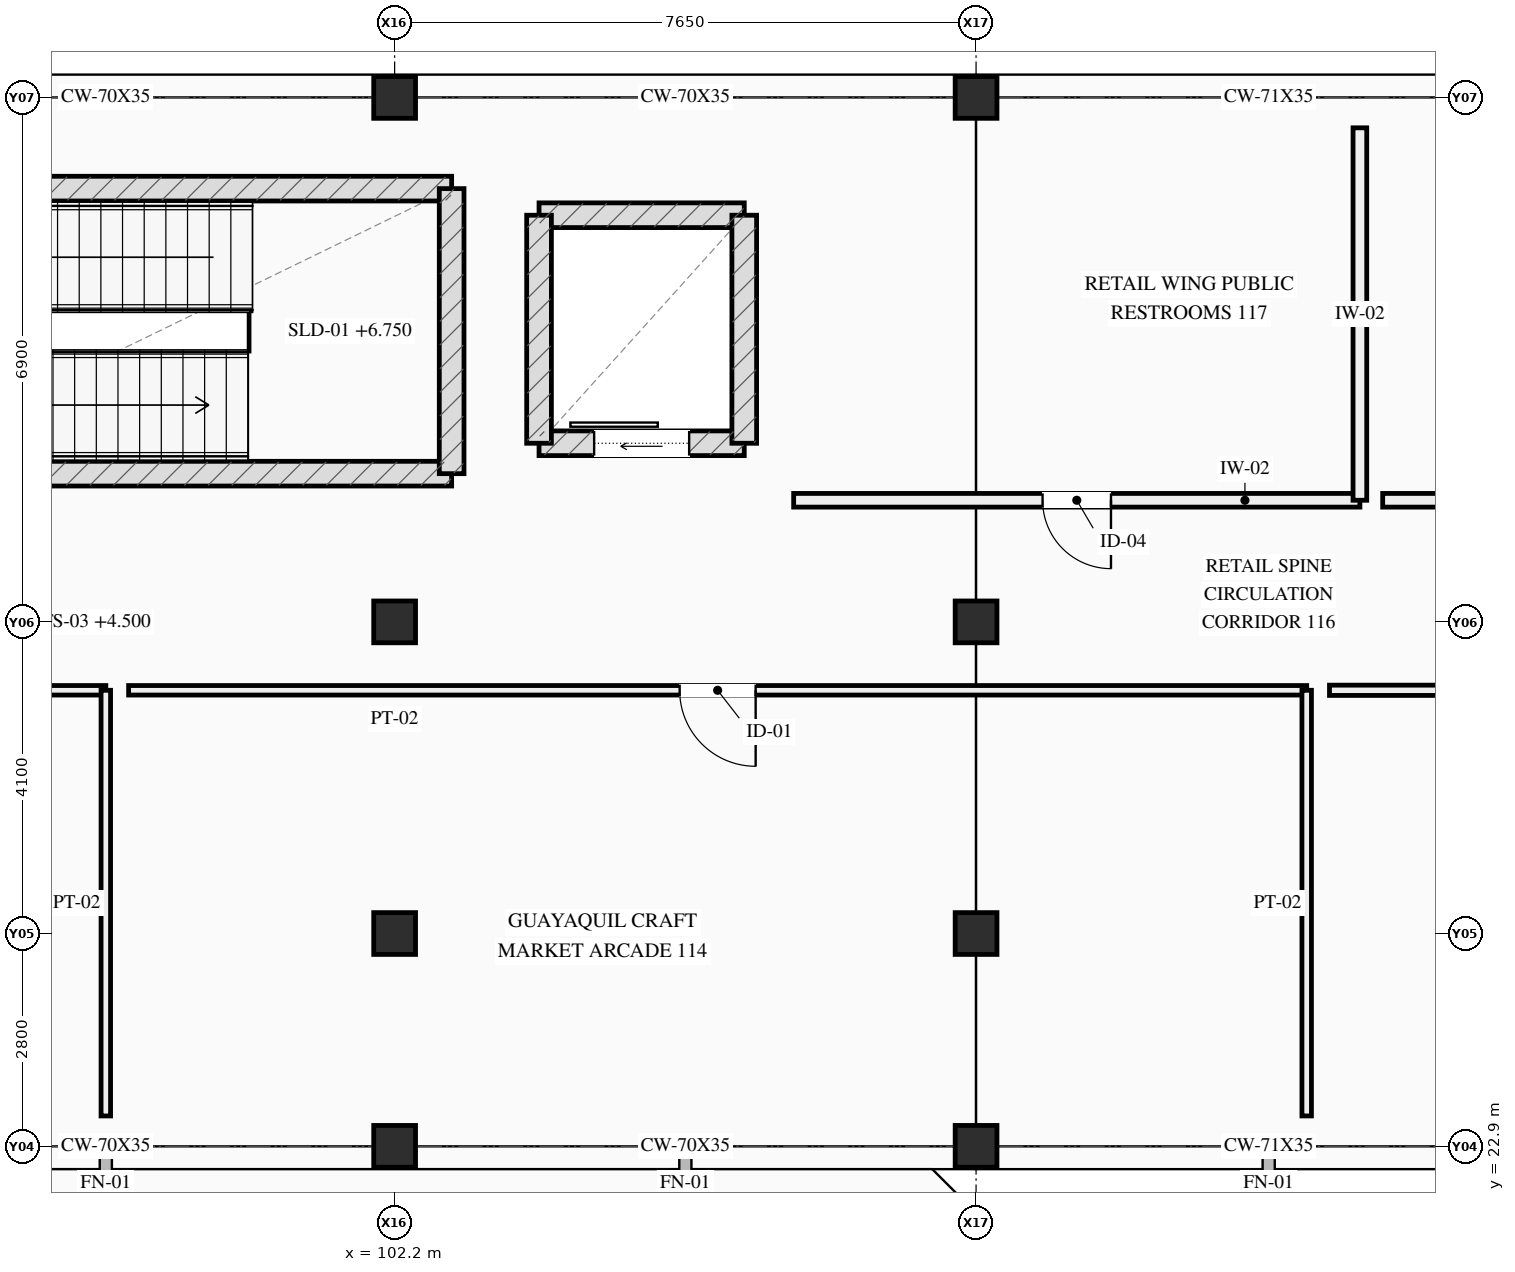
"""IFC4 building model, lengths in metres.
Left out: names, types, materials, properties, quantities, classifications, styles, units other than length and angle.
Written with IfcOpenShell. Run it as: python <this file> out.ifc"""

import sys

from ifc_helpers import new_model, si_unit, direction, frame, frame_2d, origin, origin_2d, place, context, subcontext, project, spatial, rectangle, extrude, element, fill, save


model = new_model("IFC4")
c1 = context("Model", 3, precision=1e-05, world=origin(), true_north=direction((0.0, 1.0)))
c2 = subcontext(c1, "Body", "Model", "MODEL_VIEW")
j1 = project(units=[si_unit("LENGTHUNIT", "METRE"), si_unit("PLANEANGLEUNIT", "RADIAN")], contexts=[c1])
p1 = place(None, origin())
s1 = spatial("IfcSite", under=j1, at=p1, CompositionType="ELEMENT")
p2 = place(p1, origin())
s2 = spatial("IfcBuilding", under=s1, at=p2, CompositionType="ELEMENT")
p3 = place(p2, frame((0.0, 0.0, 4.5)))
s3 = spatial("IfcBuildingStorey", under=s2, at=p3, CompositionType="ELEMENT", Elevation=4.5)
for number, where, z_axis, x_axis in (
    (1, (102.2, 22.9, 0.0), (0.0, 0.0, 1.0), (1.0, 0.0, 0.0)),
    (2, (102.2, 25.7, 0.0), (0.0, 0.0, 1.0), (1.0, 0.0, 0.0)),
    (3, (102.2, 29.8, 0.0), (0.0, 0.0, 1.0), (1.0, 0.0, 0.0)),
    (4, (102.2, 36.7, 0.0), (0.0, 0.0, 1.0), (1.0, 0.0, 0.0)),
    (5, (109.85, 22.9, 0.0), (0.0, 0.0, 1.0), (1.0, 0.0, 0.0)),
    (6, (109.85, 25.7, 0.0), (0.0, 0.0, 1.0), (1.0, 0.0, 0.0)),
    (7, (109.85, 29.8, 0.0), (0.0, 0.0, 1.0), (1.0, 0.0, 0.0)),
    (8, (109.85, 36.7, 0.0), (0.0, 0.0, 1.0), (1.0, 0.0, 0.0)),
):
    element("IfcColumn", number, at=place(p3, frame(where, z_axis=z_axis, x_axis=x_axis)), inside=s3, PredefinedType="COLUMN", context=c2, shape_type="SweptSolid", body=[
        extrude(rectangle(XDim=0.55, YDim=0.55, at=origin_2d()), origin(), (0.0, 0.0, 1.0), 4.5),
    ])
p4 = place(p3, frame((95.25, 31.75, 0.0), z_axis=(0.0, 0.0, 1.0), x_axis=(1.0, 0.0, 0.0)))
e9 = element("IfcWall", 9, at=p4, inside=s3, PredefinedType="SHEAR", context=c2, shape_type="SweptSolid", body=[
    extrude(rectangle(XDim=7.7, YDim=0.325, at=frame_2d((3.85, 0.0))), origin(), (0.0, 0.0, 1.0), 4.25),
])
p5 = place(p4, frame((0.28, 0.0, 0.0)))
e10 = element("IfcOpeningElement", 10, at=p5, cuts=e9, PredefinedType="OPENING", context=c2, shape_type="SweptSolid", body=[
    extrude(rectangle(XDim=1.2, YDim=2.2, at=frame_2d((0.6, 1.1))), frame((0.0, 0.172, 0.0), z_axis=(0.0, -1.0, 0.0), x_axis=(1.0, 0.0, 0.0)), (0.0, 0.0, 1.0), 0.345),
])
p6 = place(p3, frame((102.95, 35.5, 0.0), z_axis=(0.0, 0.0, 1.0), x_axis=(-1.0, 0.0, 0.0)))
e11 = element("IfcWall", 11, at=p6, inside=s3, PredefinedType="SHEAR", context=c2, shape_type="SweptSolid", body=[
    extrude(rectangle(XDim=7.7, YDim=0.325, at=frame_2d((3.85, 0.0))), origin(), (0.0, 0.0, 1.0), 4.25),
])
p7 = place(p3, frame((102.95, 31.75, 0.0), z_axis=(0.0, 0.0, 1.0), x_axis=(0.0, 1.0, 0.0)))
e12 = element("IfcWall", 12, at=p7, inside=s3, PredefinedType="SHEAR", context=c2, shape_type="SweptSolid", body=[
    extrude(rectangle(XDim=3.75, YDim=0.325, at=frame_2d((1.875, 0.0))), origin(), (0.0, 0.0, 1.0), 4.25),
])
p8 = place(p3, frame((104.1, 32.15, 0.0), z_axis=(0.0, 0.0, 1.0), x_axis=(1.0, 0.0, 0.0)))
e13 = element("IfcWall", 13, at=p8, inside=s3, PredefinedType="SHEAR", context=c2, shape_type="SweptSolid", body=[
    extrude(rectangle(XDim=2.7, YDim=0.325, at=frame_2d((1.35, 0.0))), origin(), (0.0, 0.0, 1.0), 4.25),
])
p9 = place(p8, frame((0.725, 0.0, 0.0)))
e14 = element("IfcOpeningElement", 14, at=p9, cuts=e13, PredefinedType="OPENING", context=c2, shape_type="SweptSolid", body=[
    extrude(rectangle(XDim=1.25, YDim=2.2, at=frame_2d((0.625, 1.1))), frame((0.0, 0.172, 0.0), z_axis=(0.0, -1.0, 0.0), x_axis=(1.0, 0.0, 0.0)), (0.0, 0.0, 1.0), 0.345),
])
p10 = place(p3, frame((104.1, 35.15, 0.0), z_axis=(0.0, 0.0, 1.0), x_axis=(1.0, 0.0, 0.0)))
e15 = element("IfcWall", 15, at=p10, inside=s3, PredefinedType="SHEAR", context=c2, shape_type="SweptSolid", body=[
    extrude(rectangle(XDim=2.7, YDim=0.325, at=frame_2d((1.35, 0.0))), origin(), (0.0, 0.0, 1.0), 4.25),
])
for number, where, z_axis, x_axis in (
    (16, (104.1, 32.15, 0.0), (0.0, 0.0, 1.0), (0.0, 1.0, 0.0)),
    (17, (106.8, 32.15, 0.0), (0.0, 0.0, 1.0), (0.0, 1.0, 0.0)),
):
    element("IfcWall", number, at=place(p3, frame(where, z_axis=z_axis, x_axis=x_axis)), inside=s3, PredefinedType="SHEAR", context=c2, shape_type="SweptSolid", body=[
        extrude(rectangle(XDim=3.0, YDim=0.325, at=frame_2d((1.5, 0.0))), origin(), (0.0, 0.0, 1.0), 4.25),
    ])
p11 = place(p3, frame((87.4, 28.9, 0.0), z_axis=(0.0, 0.0, 1.0), x_axis=(1.0, 0.0, 0.0)))
e18 = element("IfcWall", 18, at=p11, inside=s3, PredefinedType="PARTITIONING", context=c2, shape_type="SweptSolid", body=[
    extrude(rectangle(XDim=11.0, YDim=0.125, at=frame_2d((5.5, 0.0))), origin(), (0.0, 0.0, 1.0), 3.3),
])
p12 = place(p11, frame((4.65, 0.0, 0.0)))
e19 = element("IfcOpeningElement", 19, at=p12, cuts=e18, PredefinedType="OPENING", context=c2, shape_type="SweptSolid", body=[
    extrude(rectangle(XDim=1.0, YDim=2.15, at=frame_2d((0.5, 1.075))), frame((0.0, 0.073, 0.0), z_axis=(0.0, -1.0, 0.0), x_axis=(1.0, 0.0, 0.0)), (0.0, 0.0, 1.0), 0.145),
])
p13 = place(p3, frame((98.4, 23.3, 0.0), z_axis=(0.0, 0.0, 1.0), x_axis=(0.0, 1.0, 0.0)))
e20 = element("IfcWall", 20, at=p13, inside=s3, PredefinedType="PARTITIONING", context=c2, shape_type="SweptSolid", body=[
    extrude(rectangle(XDim=5.6, YDim=0.125, at=frame_2d((2.8, 0.0))), origin(), (0.0, 0.0, 1.0), 3.3),
])
p14 = place(p3, frame((98.7, 28.9, 0.0), z_axis=(0.0, 0.0, 1.0), x_axis=(1.0, 0.0, 0.0)))
e21 = element("IfcWall", 21, at=p14, inside=s3, PredefinedType="PARTITIONING", context=c2, shape_type="SweptSolid", body=[
    extrude(rectangle(XDim=15.5, YDim=0.125, at=frame_2d((7.75, 0.0))), origin(), (0.0, 0.0, 1.0), 3.3),
])
p15 = place(p14, frame((7.25, 0.0, 0.0)))
e22 = element("IfcOpeningElement", 22, at=p15, cuts=e21, PredefinedType="OPENING", context=c2, shape_type="SweptSolid", body=[
    extrude(rectangle(XDim=1.0, YDim=2.15, at=frame_2d((0.5, 1.075))), frame((0.0, 0.073, 0.0), z_axis=(0.0, -1.0, 0.0), x_axis=(1.0, 0.0, 0.0)), (0.0, 0.0, 1.0), 0.145),
])
p16 = place(p3, frame((114.2, 23.3, 0.0), z_axis=(0.0, 0.0, 1.0), x_axis=(0.0, 1.0, 0.0)))
e23 = element("IfcWall", 23, at=p16, inside=s3, PredefinedType="PARTITIONING", context=c2, shape_type="SweptSolid", body=[
    extrude(rectangle(XDim=5.6, YDim=0.125, at=frame_2d((2.8, 0.0))), origin(), (0.0, 0.0, 1.0), 3.3),
])
p17 = place(p3, frame((114.5, 28.9, 0.0), z_axis=(0.0, 0.0, 1.0), x_axis=(1.0, 0.0, 0.0)))
e24 = element("IfcWall", 24, at=p17, inside=s3, PredefinedType="PARTITIONING", context=c2, shape_type="SweptSolid", body=[
    extrude(rectangle(XDim=18.05, YDim=0.135, at=frame_2d((9.025, 0.0))), origin(), (0.0, 0.0, 1.0), 3.3),
])
p18 = place(p17, frame((7.575, 0.0, 0.0)))
e25 = element("IfcOpeningElement", 25, at=p18, cuts=e24, PredefinedType="OPENING", context=c2, shape_type="SweptSolid", body=[
    extrude(rectangle(XDim=1.5, YDim=2.2, at=frame_2d((0.75, 1.1))), frame((0.0, 0.077, 0.0), z_axis=(0.0, -1.0, 0.0), x_axis=(1.0, 0.0, 0.0)), (0.0, 0.0, 1.0), 0.155),
])
p19 = place(p3, frame((107.45, 31.4, 0.0), z_axis=(0.0, 0.0, 1.0), x_axis=(1.0, 0.0, 0.0)))
e26 = element("IfcWall", 26, at=p19, inside=s3, PredefinedType="PLUMBINGWALL", context=c2, shape_type="SweptSolid", body=[
    extrude(rectangle(XDim=7.45, YDim=0.18, at=frame_2d((3.725, 0.0))), origin(), (0.0, 0.0, 1.0), 3.3),
])
p20 = place(p19, frame((3.275, 0.0, 0.0)))
e27 = element("IfcOpeningElement", 27, at=p20, cuts=e26, PredefinedType="OPENING", context=c2, shape_type="SweptSolid", body=[
    extrude(rectangle(XDim=0.9, YDim=2.1, at=frame_2d((0.45, 1.05))), frame((0.0, 0.1, 0.0), z_axis=(0.0, -1.0, 0.0), x_axis=(1.0, 0.0, 0.0)), (0.0, 0.0, 1.0), 0.2),
])
p21 = place(p3, frame((114.9, 31.4, 0.0), z_axis=(0.0, 0.0, 1.0), x_axis=(0.0, 1.0, 0.0)))
e28 = element("IfcWall", 28, at=p21, inside=s3, PredefinedType="PLUMBINGWALL", context=c2, shape_type="SweptSolid", body=[
    extrude(rectangle(XDim=4.9, YDim=0.18, at=frame_2d((2.45, 0.0))), origin(), (0.0, 0.0, 1.0), 3.3),
])
p22 = place(p3, frame((115.2, 31.4, 0.0), z_axis=(0.0, 0.0, 1.0), x_axis=(1.0, 0.0, 0.0)))
e29 = element("IfcWall", 29, at=p22, inside=s3, PredefinedType="PLUMBINGWALL", context=c2, shape_type="SweptSolid", body=[
    extrude(rectangle(XDim=5.0, YDim=0.18, at=frame_2d((2.5, 0.0))), origin(), (0.0, 0.0, 1.0), 3.3),
])
p23 = place(p22, frame((3.09, 0.0, 0.0)))
e30 = element("IfcOpeningElement", 30, at=p23, cuts=e29, PredefinedType="OPENING", context=c2, shape_type="SweptSolid", body=[
    extrude(rectangle(XDim=0.92, YDim=2.1, at=frame_2d((0.46, 1.05))), frame((0.0, 0.1, 0.0), z_axis=(0.0, -1.0, 0.0), x_axis=(1.0, 0.0, 0.0)), (0.0, 0.0, 1.0), 0.2),
])
p24 = place(p9, origin())
e31 = element("IfcDoor", 31, at=p24, inside=s3, OperationType="SLIDING_TO_LEFT", PredefinedType="DOOR", context=c2, shape_type="SweptSolid", body=[
    extrude(rectangle(XDim=1.25, YDim=2.2, at=frame_2d((0.625, 1.1))), frame((0.0, 0.025, 0.0), z_axis=(0.0, -1.0, 0.0), x_axis=(1.0, 0.0, 0.0)), (0.0, 0.0, 1.0), 0.05),
])
fill(e14, e31)
p25 = place(p15, origin())
e32 = element("IfcDoor", 32, at=p25, inside=s3, OperationType="SINGLE_SWING_RIGHT", PredefinedType="DOOR", context=c2, shape_type="SweptSolid", body=[
    extrude(rectangle(XDim=1.0, YDim=2.15, at=frame_2d((0.5, 1.075))), frame((0.0, 0.025, 0.0), z_axis=(0.0, -1.0, 0.0), x_axis=(1.0, 0.0, 0.0)), (0.0, 0.0, 1.0), 0.05),
])
fill(e22, e32)
p26 = place(p20, origin())
e33 = element("IfcDoor", 33, at=p26, inside=s3, OperationType="SINGLE_SWING_RIGHT", PredefinedType="DOOR", context=c2, shape_type="SweptSolid", body=[
    extrude(rectangle(XDim=0.9, YDim=2.1, at=frame_2d((0.45, 1.05))), frame((0.0, 0.025, 0.0), z_axis=(0.0, -1.0, 0.0), x_axis=(1.0, 0.0, 0.0)), (0.0, 0.0, 1.0), 0.05),
])
fill(e27, e33)
save(model, sys.argv[1])
